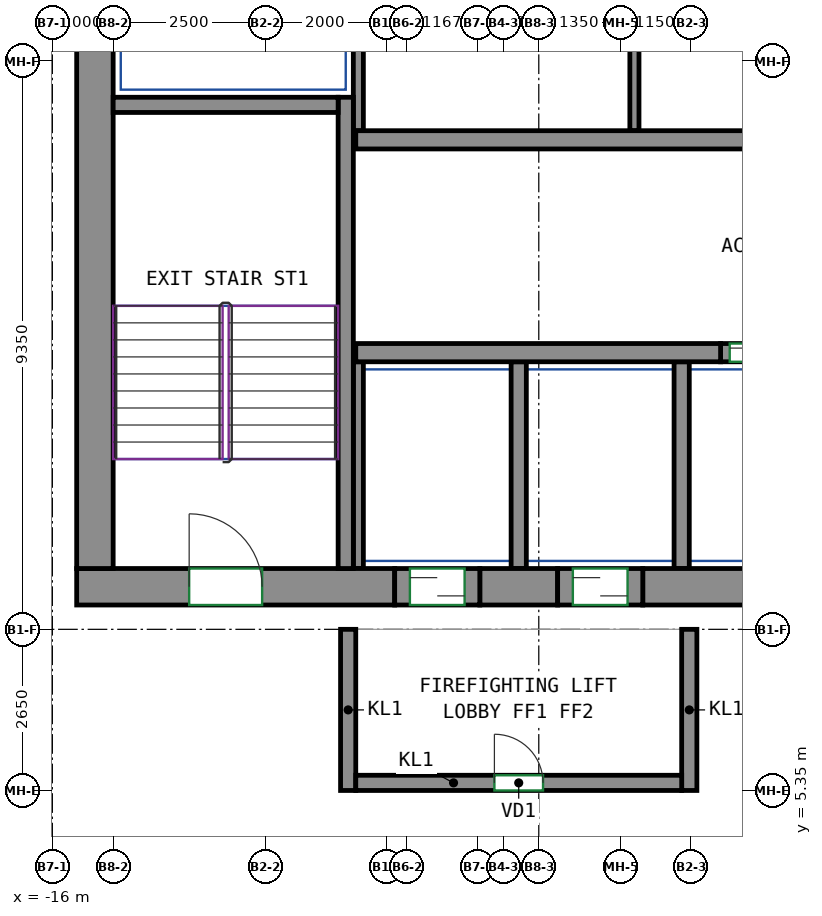
"""IFC4 building model, lengths in metres.
Left out: names, types, materials, properties, quantities, classifications, styles, units other than length and angle.
Written with IfcOpenShell. Run it as: python <this file> out.ifc"""

import sys

from ifc_helpers import new_model, si_unit, direction, frame, frame_2d, origin, place, context, subcontext, project, spatial, rectangle, extrude, source, transform, mapped, element, fill, save


model = new_model("IFC4")
c1 = context("Model", 3, precision=1e-05, world=origin(), true_north=direction((0.0, 1.0)))
c2 = subcontext(c1, "Body", "Model", "MODEL_VIEW")
j1 = project(units=[si_unit("LENGTHUNIT", "METRE"), si_unit("PLANEANGLEUNIT", "RADIAN")], contexts=[c1])
p1 = place(None, origin())
s1 = spatial("IfcSite", under=j1, at=p1, CompositionType="ELEMENT")
p2 = place(p1, origin())
s2 = spatial("IfcBuilding", under=s1, at=p2, CompositionType="ELEMENT")
p3 = place(p2, frame((0.0, 0.0, 315.4)))
s3 = spatial("IfcBuildingStorey", under=s2, at=p3, CompositionType="ELEMENT", Elevation=315.4)
m1 = source(origin(), c2, "Body", "SweptSolid", [
    extrude(rectangle(XDim=5.23, YDim=0.6, at=frame_2d((2.615, 0.0))), origin(), (0.0, 0.0, 1.0), 3.0),
])
p4 = place(p3, frame((-15.6, 8.7, 0.0), z_axis=(0.0, 0.0, 1.0), x_axis=(1.0, 0.0, 0.0)))
e1 = element("IfcWall", 1, at=p4, inside=s3, PredefinedType="SHEAR", context=c2, shape_type="MappedRepresentation", body=[
    mapped(m1, transform((0.0, 0.0, 0.0))),
])
p5 = place(p4, frame((1.85, 0.0, 0.0)))
e2 = element("IfcOpeningElement", 2, at=p5, cuts=e1, PredefinedType="OPENING", context=c2, shape_type="SweptSolid", body=[
    extrude(rectangle(XDim=1.2, YDim=2.1, at=frame_2d((0.6, 1.05))), frame((0.0, 0.31, 0.0), z_axis=(0.0, -1.0, 0.0), x_axis=(1.0, 0.0, 0.0)), (0.0, 0.0, 1.0), 0.62),
])
m2 = source(origin(), c2, "Body", "SweptSolid", [
    extrude(rectangle(XDim=1.28, YDim=0.6, at=frame_2d((0.64, 0.0))), origin(), (0.0, 0.0, 1.0), 3.0),
])
p6 = place(p3, frame((-8.97, 8.7, 0.0), z_axis=(0.0, 0.0, 1.0), x_axis=(1.0, 0.0, 0.0)))
e3 = element("IfcWall", 3, at=p6, inside=s3, PredefinedType="SHEAR", context=c2, shape_type="MappedRepresentation", body=[
    mapped(m2, transform((0.0, 0.0, 0.0))),
])
m3 = source(origin(), c2, "Body", "SweptSolid", [
    extrude(rectangle(XDim=14.18, YDim=0.6, at=frame_2d((7.09, 0.0))), origin(), (0.0, 0.0, 1.0), 3.0),
])
p7 = place(p3, frame((-6.29, 8.7, 0.0), z_axis=(0.0, 0.0, 1.0), x_axis=(1.0, 0.0, 0.0)))
e4 = element("IfcWall", 4, at=p7, inside=s3, PredefinedType="SHEAR", context=c2, shape_type="MappedRepresentation", body=[
    mapped(m3, transform((0.0, 0.0, 0.0))),
])
m4 = source(origin(), c2, "Body", "SweptSolid", [
    extrude(rectangle(XDim=12.0, YDim=0.6, at=frame_2d((6.0, 0.0))), origin(), (0.0, 0.0, 1.0), 3.0),
])
p8 = place(p3, frame((-15.3, 9.0, 0.0), z_axis=(0.0, 0.0, 1.0), x_axis=(0.0, 1.0, 0.0)))
e5 = element("IfcWall", 5, at=p8, inside=s3, PredefinedType="SHEAR", context=c2, shape_type="MappedRepresentation", body=[
    mapped(m4, transform((0.0, 0.0, 0.0))),
])
m5 = source(origin(), c2, "Body", "SweptSolid", [
    extrude(rectangle(XDim=7.75, YDim=0.25, at=frame_2d((3.875, 0.0))), origin(), (0.0, 0.0, 1.0), 3.0),
])
p9 = place(p3, frame((-11.175, 9.0, 0.0), z_axis=(0.0, 0.0, 1.0), x_axis=(0.0, 1.0, 0.0)))
e6 = element("IfcWall", 6, at=p9, inside=s3, PredefinedType="SHEAR", context=c2, shape_type="MappedRepresentation", body=[
    mapped(m5, transform((0.0, 0.0, 0.0))),
])
m6 = source(origin(), c2, "Body", "SweptSolid", [
    extrude(rectangle(XDim=3.7, YDim=0.25, at=frame_2d((1.85, 0.0))), origin(), (0.0, 0.0, 1.0), 3.0),
])
p10 = place(p3, frame((-15.0, 16.625, 0.0), z_axis=(0.0, 0.0, 1.0), x_axis=(1.0, 0.0, 0.0)))
e7 = element("IfcWall", 7, at=p10, inside=s3, PredefinedType="SHEAR", context=c2, shape_type="MappedRepresentation", body=[
    mapped(m6, transform((0.0, 0.0, 0.0))),
])
m7 = source(origin(), c2, "Body", "SweptSolid", [
    extrude(rectangle(XDim=6.0, YDim=0.3, at=frame_2d((3.0, 0.0))), origin(), (0.0, 0.0, 1.0), 3.0),
])
p11 = place(p3, frame((-11.01, 12.55, 0.0), z_axis=(0.0, 0.0, 1.0), x_axis=(1.0, 0.0, 0.0)))
e8 = element("IfcWall", 8, at=p11, inside=s3, PredefinedType="SHEAR", context=c2, shape_type="MappedRepresentation", body=[
    mapped(m7, transform((0.0, 0.0, 0.0))),
])
m8 = source(origin(), c2, "Body", "SweptSolid", [
    extrude(rectangle(XDim=22.08, YDim=0.3, at=frame_2d((11.04, 0.0))), origin(), (0.0, 0.0, 1.0), 3.0),
])
p12 = place(p3, frame((-11.01, 16.05, 0.0), z_axis=(0.0, 0.0, 1.0), x_axis=(1.0, 0.0, 0.0)))
e9 = element("IfcWall", 9, at=p12, inside=s3, PredefinedType="SHEAR", context=c2, shape_type="MappedRepresentation", body=[
    mapped(m8, transform((0.0, 0.0, 0.0))),
])
m9 = source(origin(), c2, "Body", "SweptSolid", [
    extrude(rectangle(XDim=1.4, YDim=0.3, at=frame_2d((0.7, 0.0))), origin(), (0.0, 0.0, 1.0), 3.0),
])
p13 = place(p3, frame((-5.01, 12.55, 0.0), z_axis=(0.0, 0.0, 1.0), x_axis=(1.0, 0.0, 0.0)))
e10 = element("IfcWall", 10, at=p13, inside=s3, PredefinedType="PARTITIONING", context=c2, shape_type="MappedRepresentation", body=[
    mapped(m9, transform((0.0, 0.0, 0.0))),
])
p14 = place(p13, frame((0.15, 0.0, 0.0)))
e11 = element("IfcOpeningElement", 11, at=p14, cuts=e10, PredefinedType="OPENING", context=c2, shape_type="SweptSolid", body=[
    extrude(rectangle(XDim=1.1, YDim=2.1, at=frame_2d((0.55, 1.05))), frame((0.0, 0.16, 0.0), z_axis=(0.0, -1.0, 0.0), x_axis=(1.0, 0.0, 0.0)), (0.0, 0.0, 1.0), 0.32),
])
m10 = source(origin(), c2, "Body", "SweptSolid", [
    extrude(rectangle(XDim=2.65, YDim=0.25, at=frame_2d((1.325, 0.0))), origin(), (0.0, 0.0, 1.0), 3.0),
])
for number, where, z_axis, x_axis in (
    (12, (-11.135, 5.35, 0.0), (0.0, 0.0, 1.0), (0.0, 1.0, 0.0)),
    (13, (-5.525, 5.35, 0.0), (0.0, 0.0, 1.0), (0.0, 1.0, 0.0)),
):
    element("IfcWall", number, at=place(p3, frame(where, z_axis=z_axis, x_axis=x_axis)), inside=s3, PredefinedType="PARTITIONING", context=c2, shape_type="MappedRepresentation", body=[
        mapped(m10, transform((0.0, 0.0, 0.0))),
    ])
m11 = source(origin(), c2, "Body", "SweptSolid", [
    extrude(rectangle(XDim=5.36, YDim=0.25, at=frame_2d((2.68, 0.0))), origin(), (0.0, 0.0, 1.0), 3.0),
])
p15 = place(p3, frame((-11.01, 5.475, 0.0), z_axis=(0.0, 0.0, 1.0), x_axis=(1.0, 0.0, 0.0)))
e14 = element("IfcWall", 14, at=p15, inside=s3, PredefinedType="PARTITIONING", context=c2, shape_type="MappedRepresentation", body=[
    mapped(m11, transform((0.0, 0.0, 0.0))),
])
p16 = place(p15, frame((2.28, 0.0, 0.0)))
e15 = element("IfcOpeningElement", 15, at=p16, cuts=e14, PredefinedType="OPENING", context=c2, shape_type="SweptSolid", body=[
    extrude(rectangle(XDim=0.8, YDim=2.0, at=frame_2d((0.4, 1.0))), frame((0.0, 0.135, 0.0), z_axis=(0.0, -1.0, 0.0), x_axis=(1.0, 0.0, 0.0)), (0.0, 0.0, 1.0), 0.27),
])
m12 = source(origin(), c2, "Body", "SweptSolid", [
    extrude(rectangle(XDim=4.8, YDim=0.165, at=frame_2d((2.4, 0.0))), origin(), (0.0, 0.0, 1.0), 3.0),
])
p17 = place(p3, frame((-10.968, 16.2, 0.0), z_axis=(0.0, 0.0, 1.0), x_axis=(0.0, 1.0, 0.0)))
e16 = element("IfcWall", 16, at=p17, inside=s3, PredefinedType="PARTITIONING", context=c2, shape_type="MappedRepresentation", body=[
    mapped(m12, transform((0.0, 0.0, 0.0))),
])
m13 = source(origin(), c2, "Body", "SweptSolid", [
    extrude(rectangle(XDim=3.4, YDim=0.165, at=frame_2d((1.7, 0.0))), origin(), (0.0, 0.0, 1.0), 3.0),
])
p18 = place(p3, frame((-10.968, 9.0, 0.0), z_axis=(0.0, 0.0, 1.0), x_axis=(0.0, 1.0, 0.0)))
e17 = element("IfcWall", 17, at=p18, inside=s3, PredefinedType="PARTITIONING", context=c2, shape_type="MappedRepresentation", body=[
    mapped(m13, transform((0.0, 0.0, 0.0))),
])
m14 = source(origin(), c2, "Body", "SweptSolid", [
    extrude(rectangle(XDim=3.4, YDim=0.25, at=frame_2d((1.7, 0.0))), origin(), (0.0, 0.0, 1.0), 3.0),
])
for number, where, z_axis, x_axis in (
    (18, (-5.65, 9.0, 0.0), (0.0, 0.0, 1.0), (0.0, 1.0, 0.0)),
    (19, (-8.33, 9.0, 0.0), (0.0, 0.0, 1.0), (0.0, 1.0, 0.0)),
):
    element("IfcWall", number, at=place(p3, frame(where, z_axis=z_axis, x_axis=x_axis)), inside=s3, PredefinedType="PARTITIONING", context=c2, shape_type="MappedRepresentation", body=[
        mapped(m14, transform((0.0, 0.0, 0.0))),
    ])
m15 = source(origin(), c2, "Body", "SweptSolid", [
    extrude(rectangle(XDim=4.8, YDim=0.15, at=frame_2d((2.4, 0.0))), origin(), (0.0, 0.0, 1.0), 3.0),
])
p19 = place(p3, frame((-6.427, 16.2, 0.0), z_axis=(0.0, 0.0, 1.0), x_axis=(0.0, 1.0, 0.0)))
e20 = element("IfcWall", 20, at=p19, inside=s3, PredefinedType="PARTITIONING", context=c2, shape_type="MappedRepresentation", body=[
    mapped(m15, transform((0.0, 0.0, 0.0))),
])
m16 = source(origin(), c2, "Body", "SweptSolid", [
    extrude(rectangle(XDim=1.4, YDim=0.6, at=frame_2d((0.7, 0.0))), origin(), (0.0, 0.0, 1.0), 2.7),
])
p20 = place(p3, frame((-10.37, 8.7, 0.0), z_axis=(0.0, 0.0, 1.0), x_axis=(1.0, 0.0, 0.0)))
e21 = element("IfcWall", 21, at=p20, inside=s3, PredefinedType="PARTITIONING", context=c2, shape_type="MappedRepresentation", body=[
    mapped(m16, transform((0.0, 0.0, 0.0))),
])
p21 = place(p20, frame((0.25, 0.0, 0.0)))
e22 = element("IfcOpeningElement", 22, at=p21, cuts=e21, PredefinedType="OPENING", context=c2, shape_type="SweptSolid", body=[
    extrude(rectangle(XDim=0.9, YDim=2.1, at=frame_2d((0.45, 1.05))), frame((0.0, 0.31, 0.0), z_axis=(0.0, -1.0, 0.0), x_axis=(1.0, 0.0, 0.0)), (0.0, 0.0, 1.0), 0.62),
])
m17 = source(origin(), c2, "Body", "SweptSolid", [
    extrude(rectangle(XDim=1.4, YDim=0.6, at=frame_2d((0.7, 0.0))), origin(), (0.0, 0.0, 1.0), 2.7),
])
p22 = place(p3, frame((-7.69, 8.7, 0.0), z_axis=(0.0, 0.0, 1.0), x_axis=(1.0, 0.0, 0.0)))
e23 = element("IfcWall", 23, at=p22, inside=s3, PredefinedType="PARTITIONING", context=c2, shape_type="MappedRepresentation", body=[
    mapped(m17, transform((0.0, 0.0, 0.0))),
])
p23 = place(p22, frame((0.25, 0.0, 0.0)))
e24 = element("IfcOpeningElement", 24, at=p23, cuts=e23, PredefinedType="OPENING", context=c2, shape_type="SweptSolid", body=[
    extrude(rectangle(XDim=0.9, YDim=2.1, at=frame_2d((0.45, 1.05))), frame((0.0, 0.31, 0.0), z_axis=(0.0, -1.0, 0.0), x_axis=(1.0, 0.0, 0.0)), (0.0, 0.0, 1.0), 0.62),
])
p24 = place(p16, origin())
e25 = element("IfcDoor", 25, at=p24, inside=s3, OperationType="SINGLE_SWING_LEFT", PredefinedType="DOOR", context=c2, shape_type="SweptSolid", body=[
    extrude(rectangle(XDim=0.8, YDim=2.0, at=frame_2d((0.4, 1.0))), frame((0.0, 0.025, 0.0), z_axis=(0.0, -1.0, 0.0), x_axis=(1.0, 0.0, 0.0)), (0.0, 0.0, 1.0), 0.05),
])
fill(e15, e25)
p25 = place(p21, origin())
e26 = element("IfcDoor", 26, at=p25, inside=s3, OperationType="SLIDING_TO_LEFT", PredefinedType="DOOR", context=c2, shape_type="SweptSolid", body=[
    extrude(rectangle(XDim=0.9, YDim=2.1, at=frame_2d((0.45, 1.05))), frame((0.0, 0.205, 0.0), z_axis=(0.0, -1.0, 0.0), x_axis=(1.0, 0.0, 0.0)), (0.0, 0.0, 1.0), 0.05),
])
fill(e22, e26)
p26 = place(p23, origin())
e27 = element("IfcDoor", 27, at=p26, inside=s3, OperationType="SLIDING_TO_RIGHT", PredefinedType="DOOR", context=c2, shape_type="SweptSolid", body=[
    extrude(rectangle(XDim=0.9, YDim=2.1, at=frame_2d((0.45, 1.05))), frame((0.0, 0.205, 0.0), z_axis=(0.0, -1.0, 0.0), x_axis=(1.0, 0.0, 0.0)), (0.0, 0.0, 1.0), 0.05),
])
fill(e24, e27)
p27 = place(p14, origin())
e28 = element("IfcDoor", 28, at=p27, inside=s3, OperationType="DOUBLE_DOOR_SLIDING", PredefinedType="DOOR", context=c2, shape_type="SweptSolid", body=[
    extrude(rectangle(XDim=1.1, YDim=2.1, at=frame_2d((0.55, 1.05))), frame((0.0, 0.025, 0.0), z_axis=(0.0, -1.0, 0.0), x_axis=(1.0, 0.0, 0.0)), (0.0, 0.0, 1.0), 0.05),
])
fill(e11, e28)
p28 = place(p5, origin())
e29 = element("IfcDoor", 29, at=p28, inside=s3, OperationType="DOUBLE_DOOR_SINGLE_SWING", PredefinedType="DOOR", context=c2, shape_type="SweptSolid", body=[
    extrude(rectangle(XDim=1.2, YDim=2.1, at=frame_2d((0.6, 1.05))), frame((0.0, 0.205, 0.0), z_axis=(0.0, -1.0, 0.0), x_axis=(1.0, 0.0, 0.0)), (0.0, 0.0, 1.0), 0.05),
])
fill(e2, e29)
save(model, sys.argv[1])
